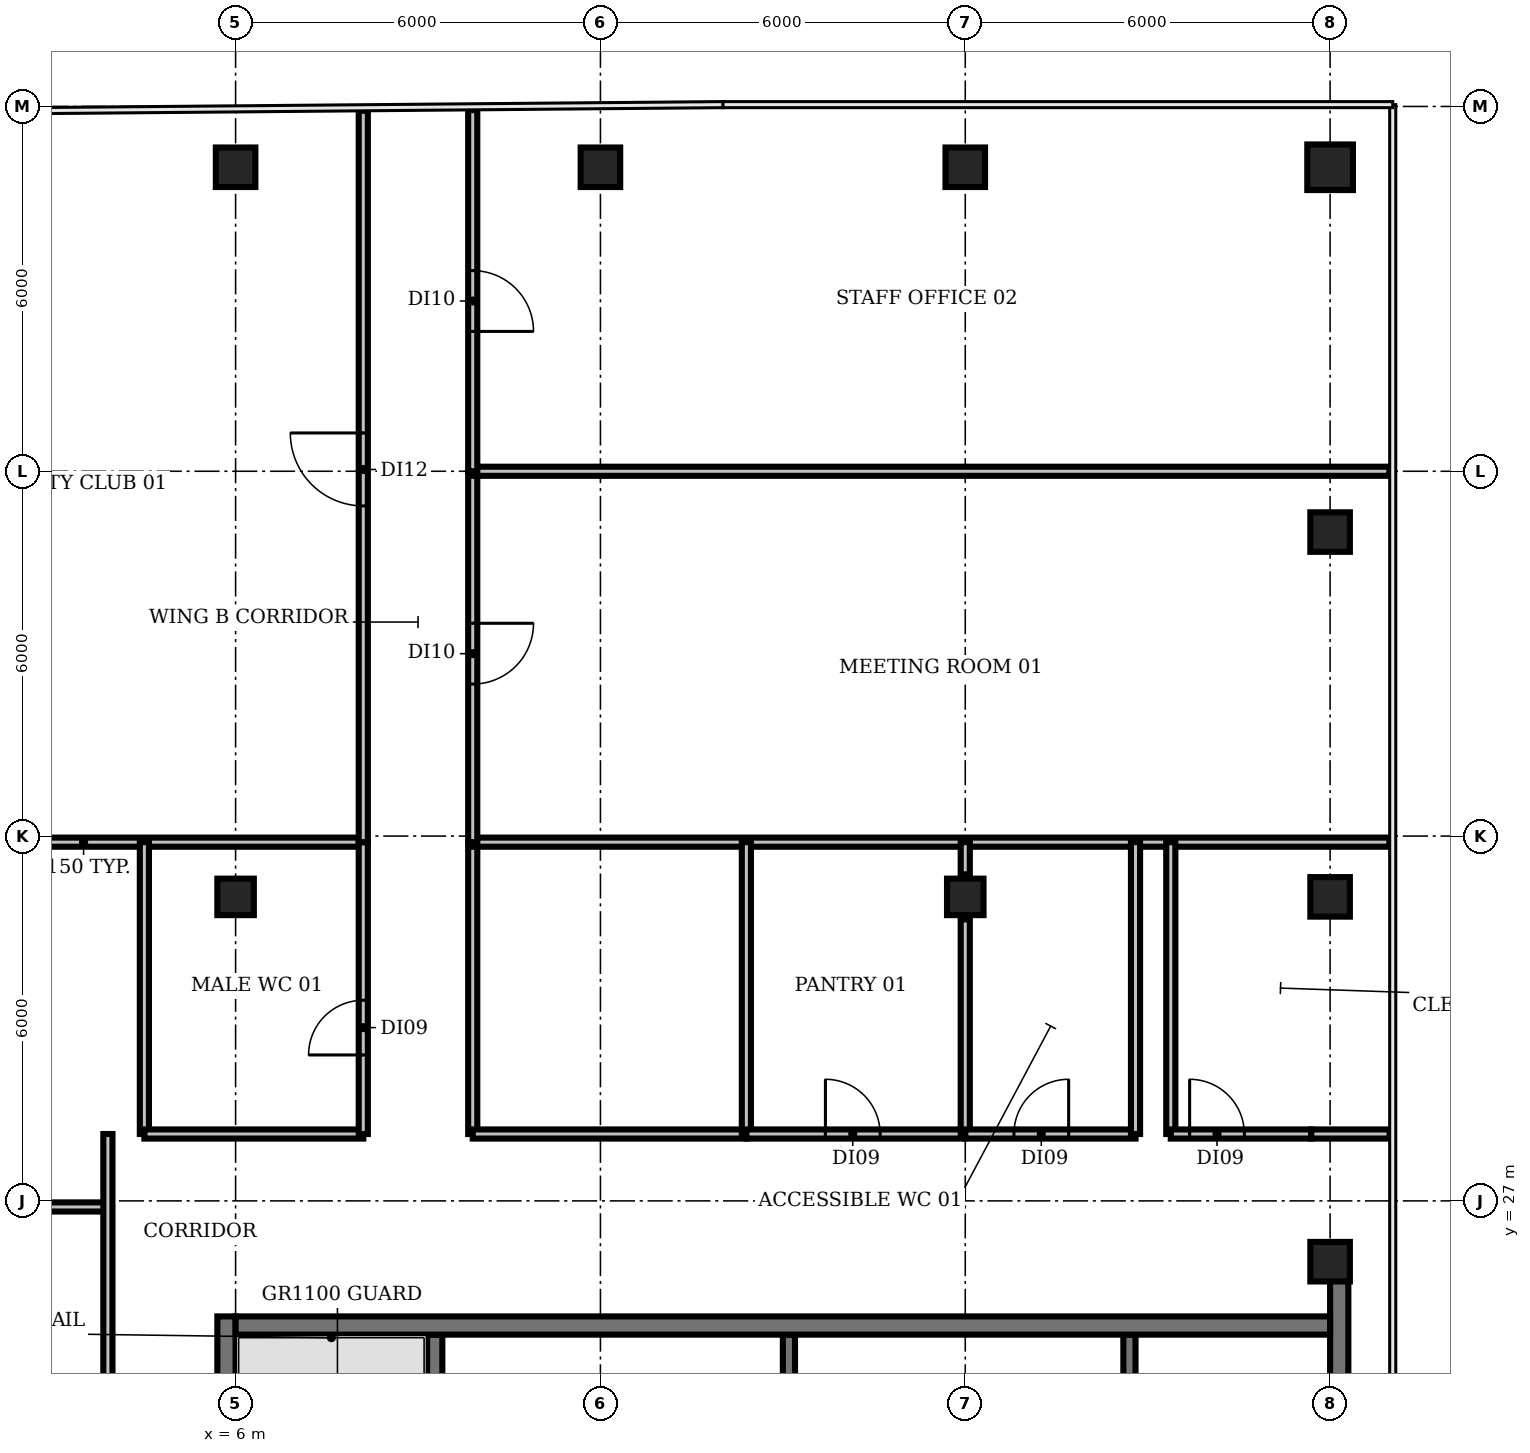
"""IFC4 building model, lengths in metres.
Left out: names, types, materials, properties, quantities, classifications, styles, units other than length and angle.
Written with IfcOpenShell. Run it as: python <this file> out.ifc"""

import sys

from ifc_helpers import new_model, si_unit, direction, frame, frame_2d, origin, origin_2d, place, context, subcontext, project, spatial, rectangle, circle, extrude, element, fill, save


model = new_model("IFC4")
c1 = context("Model", 3, precision=1e-05, world=origin(), true_north=direction((0.0, 1.0)))
c2 = subcontext(c1, "Body", "Model", "MODEL_VIEW")
j1 = project(units=[si_unit("LENGTHUNIT", "METRE"), si_unit("PLANEANGLEUNIT", "RADIAN")], contexts=[c1])
p1 = place(None, origin())
s1 = spatial("IfcSite", under=j1, at=p1, CompositionType="ELEMENT")
p2 = place(p1, origin())
s2 = spatial("IfcBuilding", under=s1, at=p2, CompositionType="ELEMENT")
p3 = place(p2, frame((0.0, 0.0, 331.4)))
s3 = spatial("IfcBuildingStorey", under=s2, at=p3, CompositionType="ELEMENT", Elevation=331.4)
p4 = place(p3, frame((6.0, 32.0, 0.0), z_axis=(0.0, 0.0, 1.0), x_axis=(1.0, 0.0, 0.0)))
e1 = element("IfcColumn", 1, at=p4, inside=s3, PredefinedType="COLUMN", context=c2, shape_type="SweptSolid", body=[
    extrude(rectangle(XDim=0.6, YDim=0.6, at=origin_2d()), origin(), (0.0, 0.0, 1.0), 3.9),
])
for number, where, z_axis, x_axis in (
    (2, (6.0, 44.0, 0.0), (0.0, 0.0, 1.0), (1.0, 0.0, 0.0)),
    (3, (12.0, 44.0, 0.0), (0.0, 0.0, 1.0), (1.0, 0.0, 0.0)),
):
    element("IfcColumn", number, at=place(p3, frame(where, z_axis=z_axis, x_axis=x_axis)), inside=s3, PredefinedType="COLUMN", context=c2, shape_type="SweptSolid", body=[
        extrude(rectangle(XDim=0.65, YDim=0.65, at=origin_2d()), origin(), (0.0, 0.0, 1.0), 3.9),
    ])
p5 = place(p3, frame((18.0, 32.0, 0.0), z_axis=(0.0, 0.0, 1.0), x_axis=(1.0, 0.0, 0.0)))
e4 = element("IfcColumn", 4, at=p5, inside=s3, PredefinedType="COLUMN", context=c2, shape_type="SweptSolid", body=[
    extrude(rectangle(XDim=0.6, YDim=0.6, at=origin_2d()), origin(), (0.0, 0.0, 1.0), 3.9),
])
for number, where, z_axis, x_axis in (
    (5, (18.0, 44.0, 0.0), (0.0, 0.0, 1.0), (1.0, 0.0, 0.0)),
    (6, (24.0, 26.0, 0.0), (0.0, 0.0, 1.0), (1.0, 0.0, 0.0)),
    (7, (24.0, 32.0, 0.0), (0.0, 0.0, 1.0), (1.0, 0.0, 0.0)),
    (8, (24.0, 38.0, 0.0), (0.0, 0.0, 1.0), (1.0, 0.0, 0.0)),
):
    element("IfcColumn", number, at=place(p3, frame(where, z_axis=z_axis, x_axis=x_axis)), inside=s3, PredefinedType="COLUMN", context=c2, shape_type="SweptSolid", body=[
        extrude(rectangle(XDim=0.65, YDim=0.65, at=origin_2d()), origin(), (0.0, 0.0, 1.0), 3.9),
    ])
p6 = place(p3, frame((24.0, 44.0, 0.0), z_axis=(0.0, 0.0, 1.0), x_axis=(1.0, 0.0, 0.0)))
e9 = element("IfcColumn", 9, at=p6, inside=s3, PredefinedType="COLUMN", context=c2, shape_type="SweptSolid", body=[
    extrude(circle(Radius=0.375, at=origin_2d()), origin(), (0.0, 0.0, 1.0), 3.9),
])
p7 = place(p3, frame((9.275, 18.375, 0.0), z_axis=(0.0, 0.0, 1.0), x_axis=(0.0, 1.0, 0.0)))
e10 = element("IfcWall", 10, at=p7, inside=s3, PredefinedType="SHEAR", context=c2, shape_type="SweptSolid", body=[
    extrude(rectangle(XDim=6.425, YDim=0.25, at=frame_2d((3.212, 0.0))), origin(), (0.0, 0.0, 1.0), 3.9),
])
for number, where, z_axis, x_axis in (
    (11, (15.1, 22.9, 0.0), (0.0, 0.0, 1.0), (0.0, 1.0, 0.0)),
    (12, (20.7, 22.9, 0.0), (0.0, 0.0, 1.0), (0.0, 1.0, 0.0)),
):
    element("IfcWall", number, at=place(p3, frame(where, z_axis=z_axis, x_axis=x_axis)), inside=s3, PredefinedType="SHEAR", context=c2, shape_type="SweptSolid", body=[
        extrude(rectangle(XDim=1.9, YDim=0.2, at=frame_2d((0.95, 0.0))), origin(), (0.0, 0.0, 1.0), 3.9),
    ])
p8 = place(p3, frame((5.85, 5.1, 0.0), z_axis=(0.0, 0.0, 1.0), x_axis=(0.0, 1.0, 0.0)))
e13 = element("IfcWall", 13, at=p8, inside=s3, PredefinedType="SHEAR", context=c2, shape_type="SweptSolid", body=[
    extrude(rectangle(XDim=20.0, YDim=0.3, at=frame_2d((10.0, 0.0))), origin(), (0.0, 0.0, 1.0), 3.9),
])
p9 = place(p8, frame((0.55, 0.0, 0.0)))
e14 = element("IfcOpeningElement", 14, at=p9, cuts=e13, PredefinedType="OPENING", context=c2, shape_type="SweptSolid", body=[
    extrude(rectangle(XDim=1.5, YDim=2.1, at=frame_2d((0.75, 1.05))), frame((0.0, 0.16, 0.0), z_axis=(0.0, -1.0, 0.0), x_axis=(1.0, 0.0, 0.0)), (0.0, 0.0, 1.0), 0.32),
])
p10 = place(p8, frame((7.0, 0.0, 0.0)))
e15 = element("IfcOpeningElement", 15, at=p10, cuts=e13, PredefinedType="OPENING", context=c2, shape_type="SweptSolid", body=[
    extrude(rectangle(XDim=1.2, YDim=2.1, at=frame_2d((0.6, 1.05))), frame((0.0, 0.16, 0.0), z_axis=(0.0, -1.0, 0.0), x_axis=(1.0, 0.0, 0.0)), (0.0, 0.0, 1.0), 0.32),
])
p11 = place(p8, frame((13.55, 0.0, 0.0)))
e16 = element("IfcOpeningElement", 16, at=p11, cuts=e13, PredefinedType="OPENING", context=c2, shape_type="SweptSolid", body=[
    extrude(rectangle(XDim=1.2, YDim=2.1, at=frame_2d((0.6, 1.05))), frame((0.0, 0.16, 0.0), z_axis=(0.0, -1.0, 0.0), x_axis=(1.0, 0.0, 0.0)), (0.0, 0.0, 1.0), 0.32),
])
p12 = place(p3, frame((24.15, 25.705, 0.0), z_axis=(0.0, 0.0, 1.0), x_axis=(0.0, -1.0, 0.0)))
e17 = element("IfcWall", 17, at=p12, inside=s3, PredefinedType="SHEAR", context=c2, shape_type="SweptSolid", body=[
    extrude(rectangle(XDim=20.605, YDim=0.3, at=frame_2d((10.302, 0.0))), origin(), (0.0, 0.0, 1.0), 3.9),
])
p13 = place(p12, frame((18.555, 0.0, 0.0)))
e18 = element("IfcOpeningElement", 18, at=p13, cuts=e17, PredefinedType="OPENING", context=c2, shape_type="SweptSolid", body=[
    extrude(rectangle(XDim=1.5, YDim=2.1, at=frame_2d((0.75, 1.05))), frame((0.0, 0.16, 0.0), z_axis=(0.0, -1.0, 0.0), x_axis=(1.0, 0.0, 0.0)), (0.0, 0.0, 1.0), 0.32),
])
p14 = place(p12, frame((12.455, 0.0, 0.0)))
e19 = element("IfcOpeningElement", 19, at=p14, cuts=e17, PredefinedType="OPENING", context=c2, shape_type="SweptSolid", body=[
    extrude(rectangle(XDim=0.9, YDim=2.1, at=frame_2d((0.45, 1.05))), frame((0.0, 0.16, 0.0), z_axis=(0.0, -1.0, 0.0), x_axis=(1.0, 0.0, 0.0)), (0.0, 0.0, 1.0), 0.32),
])
p15 = place(p12, frame((6.455, 0.0, 0.0)))
e20 = element("IfcOpeningElement", 20, at=p15, cuts=e17, PredefinedType="OPENING", context=c2, shape_type="SweptSolid", body=[
    extrude(rectangle(XDim=2.0, YDim=2.1, at=frame_2d((1.0, 1.05))), frame((0.0, 0.16, 0.0), z_axis=(0.0, -1.0, 0.0), x_axis=(1.0, 0.0, 0.0)), (0.0, 0.0, 1.0), 0.32),
])
p16 = place(p3, frame((6.0, 24.95, 0.0), z_axis=(0.0, 0.0, 1.0), x_axis=(1.0, 0.0, 0.0)))
e21 = element("IfcWall", 21, at=p16, inside=s3, PredefinedType="SHEAR", context=c2, shape_type="SweptSolid", body=[
    extrude(rectangle(XDim=18.0, YDim=0.3, at=frame_2d((9.0, 0.0))), origin(), (0.0, 0.0, 1.0), 3.9),
])
p17 = place(p3, frame((-1.1, 32.9, 0.0), z_axis=(0.0, 0.0, 1.0), x_axis=(1.0, 0.0, 0.0)))
e22 = element("IfcWall", 22, at=p17, inside=s3, PredefinedType="PARTITIONING", context=c2, shape_type="SweptSolid", body=[
    extrude(rectangle(XDim=9.2, YDim=0.15, at=frame_2d((4.6, 0.0))), origin(), (0.0, 0.0, 1.0), 2.48),
])
p18 = place(p3, frame((-1.04, 26.9, 0.0), z_axis=(0.0, 0.0, 1.0), x_axis=(1.0, 0.0, 0.0)))
e23 = element("IfcWall", 23, at=p18, inside=s3, PredefinedType="PARTITIONING", context=c2, shape_type="SweptSolid", body=[
    extrude(rectangle(XDim=4.94, YDim=0.15, at=frame_2d((2.47, 0.0))), origin(), (0.0, 0.0, 1.0), 2.48),
])
p19 = place(p3, frame((3.9, 22.5, 0.0), z_axis=(0.0, 0.0, 1.0), x_axis=(0.0, 1.0, 0.0)))
e24 = element("IfcWall", 24, at=p19, inside=s3, PredefinedType="PARTITIONING", context=c2, shape_type="SweptSolid", body=[
    extrude(rectangle(XDim=5.6, YDim=0.15, at=frame_2d((2.8, 0.0))), origin(), (0.0, 0.0, 1.0), 2.48),
])
p20 = place(p3, frame((4.5, 28.1, 0.0), z_axis=(0.0, 0.0, 1.0), x_axis=(0.0, 1.0, 0.0)))
e25 = element("IfcWall", 25, at=p20, inside=s3, PredefinedType="PARTITIONING", context=c2, shape_type="SweptSolid", body=[
    extrude(rectangle(XDim=4.8, YDim=0.15, at=frame_2d((2.4, 0.0))), origin(), (0.0, 0.0, 1.0), 2.48),
])
p21 = place(p3, frame((4.5, 28.1, 0.0), z_axis=(0.0, 0.0, 1.0), x_axis=(1.0, 0.0, 0.0)))
e26 = element("IfcWall", 26, at=p21, inside=s3, PredefinedType="PARTITIONING", context=c2, shape_type="SweptSolid", body=[
    extrude(rectangle(XDim=3.6, YDim=0.15, at=frame_2d((1.8, 0.0))), origin(), (0.0, 0.0, 1.0), 2.48),
])
p22 = place(p3, frame((8.1, 28.1, 0.0), z_axis=(0.0, 0.0, 1.0), x_axis=(0.0, 1.0, 0.0)))
e27 = element("IfcWall", 27, at=p22, inside=s3, PredefinedType="PARTITIONING", context=c2, shape_type="SweptSolid", body=[
    extrude(rectangle(XDim=4.8, YDim=0.15, at=frame_2d((2.4, 0.0))), origin(), (0.0, 0.0, 1.0), 2.48),
])
p23 = place(p22, frame((1.3, 0.0, 0.0)))
e28 = element("IfcOpeningElement", 28, at=p23, cuts=e27, PredefinedType="OPENING", context=c2, shape_type="SweptSolid", body=[
    extrude(rectangle(XDim=0.9, YDim=2.1, at=frame_2d((0.45, 1.05))), frame((0.0, 0.085, 0.0), z_axis=(0.0, -1.0, 0.0), x_axis=(1.0, 0.0, 0.0)), (0.0, 0.0, 1.0), 0.17),
])
p24 = place(p3, frame((8.1, 32.9, 0.0), z_axis=(0.0, 0.0, 1.0), x_axis=(0.0, 1.0, 0.0)))
e29 = element("IfcWall", 29, at=p24, inside=s3, PredefinedType="PARTITIONING", context=c2, shape_type="SweptSolid", body=[
    extrude(rectangle(XDim=12.03, YDim=0.15, at=frame_2d((6.015, 0.0))), origin(), (0.0, 0.0, 1.0), 2.48),
])
p25 = place(p24, frame((5.53, 0.0, 0.0)))
e30 = element("IfcOpeningElement", 30, at=p25, cuts=e29, PredefinedType="OPENING", context=c2, shape_type="SweptSolid", body=[
    extrude(rectangle(XDim=1.2, YDim=2.1, at=frame_2d((0.6, 1.05))), frame((0.0, 0.085, 0.0), z_axis=(0.0, -1.0, 0.0), x_axis=(1.0, 0.0, 0.0)), (0.0, 0.0, 1.0), 0.17),
])
p26 = place(p3, frame((9.9, 28.1, 0.0), z_axis=(0.0, 0.0, 1.0), x_axis=(0.0, 1.0, 0.0)))
e31 = element("IfcWall", 31, at=p26, inside=s3, PredefinedType="PARTITIONING", context=c2, shape_type="SweptSolid", body=[
    extrude(rectangle(XDim=4.8, YDim=0.15, at=frame_2d((2.4, 0.0))), origin(), (0.0, 0.0, 1.0), 2.48),
])
p27 = place(p3, frame((9.9, 28.1, 0.0), z_axis=(0.0, 0.0, 1.0), x_axis=(1.0, 0.0, 0.0)))
e32 = element("IfcWall", 32, at=p27, inside=s3, PredefinedType="PARTITIONING", context=c2, shape_type="SweptSolid", body=[
    extrude(rectangle(XDim=4.5, YDim=0.15, at=frame_2d((2.25, 0.0))), origin(), (0.0, 0.0, 1.0), 2.48),
])
p28 = place(p3, frame((9.9, 32.9, 0.0), z_axis=(0.0, 0.0, 1.0), x_axis=(1.0, 0.0, 0.0)))
e33 = element("IfcWall", 33, at=p28, inside=s3, PredefinedType="PARTITIONING", context=c2, shape_type="SweptSolid", body=[
    extrude(rectangle(XDim=15.075, YDim=0.15, at=frame_2d((7.538, 0.0))), origin(), (0.0, 0.0, 1.0), 2.48),
])
p29 = place(p3, frame((9.9, 39.0, 0.0), z_axis=(0.0, 0.0, 1.0), x_axis=(0.0, -1.0, 0.0)))
e34 = element("IfcWall", 34, at=p29, inside=s3, PredefinedType="PARTITIONING", context=c2, shape_type="SweptSolid", body=[
    extrude(rectangle(XDim=6.1, YDim=0.15, at=frame_2d((3.05, 0.0))), origin(), (0.0, 0.0, 1.0), 2.48),
])
p30 = place(p29, frame((2.5, 0.0, 0.0)))
e35 = element("IfcOpeningElement", 35, at=p30, cuts=e34, PredefinedType="OPENING", context=c2, shape_type="SweptSolid", body=[
    extrude(rectangle(XDim=1.0, YDim=2.1, at=frame_2d((0.5, 1.05))), frame((0.0, 0.085, 0.0), z_axis=(0.0, -1.0, 0.0), x_axis=(1.0, 0.0, 0.0)), (0.0, 0.0, 1.0), 0.17),
])
p31 = place(p3, frame((9.9, 39.0, 0.0), z_axis=(0.0, 0.0, 1.0), x_axis=(1.0, 0.0, 0.0)))
e36 = element("IfcWall", 36, at=p31, inside=s3, PredefinedType="PARTITIONING", context=c2, shape_type="SweptSolid", body=[
    extrude(rectangle(XDim=15.075, YDim=0.15, at=frame_2d((7.538, 0.0))), origin(), (0.0, 0.0, 1.0), 2.48),
])
p32 = place(p3, frame((9.9, 44.94, 0.0), z_axis=(0.0, 0.0, 1.0), x_axis=(0.0, -1.0, 0.0)))
e37 = element("IfcWall", 37, at=p32, inside=s3, PredefinedType="PARTITIONING", context=c2, shape_type="SweptSolid", body=[
    extrude(rectangle(XDim=5.94, YDim=0.15, at=frame_2d((2.97, 0.0))), origin(), (0.0, 0.0, 1.0), 2.48),
])
p33 = place(p32, frame((2.64, 0.0, 0.0)))
e38 = element("IfcOpeningElement", 38, at=p33, cuts=e37, PredefinedType="OPENING", context=c2, shape_type="SweptSolid", body=[
    extrude(rectangle(XDim=1.0, YDim=2.1, at=frame_2d((0.5, 1.05))), frame((0.0, 0.085, 0.0), z_axis=(0.0, -1.0, 0.0), x_axis=(1.0, 0.0, 0.0)), (0.0, 0.0, 1.0), 0.17),
])
p34 = place(p3, frame((14.4, 28.1, 0.0), z_axis=(0.0, 0.0, 1.0), x_axis=(0.0, 1.0, 0.0)))
e39 = element("IfcWall", 39, at=p34, inside=s3, PredefinedType="PARTITIONING", context=c2, shape_type="SweptSolid", body=[
    extrude(rectangle(XDim=4.8, YDim=0.15, at=frame_2d((2.4, 0.0))), origin(), (0.0, 0.0, 1.0), 2.48),
])
p35 = place(p3, frame((14.4, 28.1, 0.0), z_axis=(0.0, 0.0, 1.0), x_axis=(1.0, 0.0, 0.0)))
e40 = element("IfcWall", 40, at=p35, inside=s3, PredefinedType="PARTITIONING", context=c2, shape_type="SweptSolid", body=[
    extrude(rectangle(XDim=3.6, YDim=0.15, at=frame_2d((1.8, 0.0))), origin(), (0.0, 0.0, 1.0), 2.48),
])
p36 = place(p35, frame((1.3, 0.0, 0.0)))
e41 = element("IfcOpeningElement", 41, at=p36, cuts=e40, PredefinedType="OPENING", context=c2, shape_type="SweptSolid", body=[
    extrude(rectangle(XDim=0.9, YDim=2.1, at=frame_2d((0.45, 1.05))), frame((0.0, 0.085, 0.0), z_axis=(0.0, -1.0, 0.0), x_axis=(1.0, 0.0, 0.0)), (0.0, 0.0, 1.0), 0.17),
])
p37 = place(p3, frame((18.0, 28.1, 0.0), z_axis=(0.0, 0.0, 1.0), x_axis=(0.0, 1.0, 0.0)))
e42 = element("IfcWall", 42, at=p37, inside=s3, PredefinedType="PARTITIONING", context=c2, shape_type="SweptSolid", body=[
    extrude(rectangle(XDim=3.53, YDim=0.15, at=frame_2d((1.765, 0.0))), origin(), (0.0, 0.0, 1.0), 2.48),
])
p38 = place(p3, frame((18.0, 28.1, 0.0), z_axis=(0.0, 0.0, 1.0), x_axis=(1.0, 0.0, 0.0)))
e43 = element("IfcWall", 43, at=p38, inside=s3, PredefinedType="PARTITIONING", context=c2, shape_type="SweptSolid", body=[
    extrude(rectangle(XDim=2.8, YDim=0.15, at=frame_2d((1.4, 0.0))), origin(), (0.0, 0.0, 1.0), 2.48),
])
p39 = place(p38, frame((0.8, 0.0, 0.0)))
e44 = element("IfcOpeningElement", 44, at=p39, cuts=e43, PredefinedType="OPENING", context=c2, shape_type="SweptSolid", body=[
    extrude(rectangle(XDim=0.9, YDim=2.1, at=frame_2d((0.45, 1.05))), frame((0.0, 0.085, 0.0), z_axis=(0.0, -1.0, 0.0), x_axis=(1.0, 0.0, 0.0)), (0.0, 0.0, 1.0), 0.17),
])
p40 = place(p3, frame((18.0, 31.736, 0.0), z_axis=(0.0, 0.0, 1.0), x_axis=(0.0, 1.0, 0.0)))
e45 = element("IfcWall", 45, at=p40, inside=s3, PredefinedType="PARTITIONING", context=c2, shape_type="SweptSolid", body=[
    extrude(rectangle(XDim=0.529, YDim=0.15, at=frame_2d((0.264, 0.0))), origin(), (0.0, 0.0, 1.0), 2.48),
])
p41 = place(p3, frame((18.0, 32.37, 0.0), z_axis=(0.0, 0.0, 1.0), x_axis=(0.0, 1.0, 0.0)))
e46 = element("IfcWall", 46, at=p41, inside=s3, PredefinedType="PARTITIONING", context=c2, shape_type="SweptSolid", body=[
    extrude(rectangle(XDim=0.53, YDim=0.15, at=frame_2d((0.265, 0.0))), origin(), (0.0, 0.0, 1.0), 2.48),
])
for number, where, z_axis, x_axis in (
    (47, (20.8, 28.1, 0.0), (0.0, 0.0, 1.0), (0.0, 1.0, 0.0)),
    (48, (21.38, 28.1, 0.0), (0.0, 0.0, 1.0), (0.0, 1.0, 0.0)),
):
    element("IfcWall", number, at=place(p3, frame(where, z_axis=z_axis, x_axis=x_axis)), inside=s3, PredefinedType="PARTITIONING", context=c2, shape_type="SweptSolid", body=[
        extrude(rectangle(XDim=4.8, YDim=0.15, at=frame_2d((2.4, 0.0))), origin(), (0.0, 0.0, 1.0), 2.48),
    ])
p42 = place(p3, frame((21.38, 28.1, 0.0), z_axis=(0.0, 0.0, 1.0), x_axis=(1.0, 0.0, 0.0)))
e49 = element("IfcWall", 49, at=p42, inside=s3, PredefinedType="PARTITIONING", context=c2, shape_type="SweptSolid", body=[
    extrude(rectangle(XDim=2.31, YDim=0.15, at=frame_2d((1.155, 0.0))), origin(), (0.0, 0.0, 1.0), 2.48),
])
p43 = place(p42, frame((0.31, 0.0, 0.0)))
e50 = element("IfcOpeningElement", 50, at=p43, cuts=e49, PredefinedType="OPENING", context=c2, shape_type="SweptSolid", body=[
    extrude(rectangle(XDim=0.9, YDim=2.1, at=frame_2d((0.45, 1.05))), frame((0.0, 0.085, 0.0), z_axis=(0.0, -1.0, 0.0), x_axis=(1.0, 0.0, 0.0)), (0.0, 0.0, 1.0), 0.17),
])
p44 = place(p3, frame((23.69, 28.1, 0.0), z_axis=(0.0, 0.0, 1.0), x_axis=(1.0, 0.0, 0.0)))
e51 = element("IfcWall", 51, at=p44, inside=s3, PredefinedType="PARTITIONING", context=c2, shape_type="SweptSolid", body=[
    extrude(rectangle(XDim=1.29, YDim=0.15, at=frame_2d((0.645, 0.0))), origin(), (0.0, 0.0, 1.0), 2.48),
])
p45 = place(p23, origin())
e52 = element("IfcDoor", 52, at=p45, inside=s3, OperationType="SINGLE_SWING_LEFT", PredefinedType="DOOR", context=c2, shape_type="SweptSolid", body=[
    extrude(rectangle(XDim=0.9, YDim=2.1, at=frame_2d((0.45, 1.05))), frame((0.0, 0.025, 0.0), z_axis=(0.0, -1.0, 0.0), x_axis=(1.0, 0.0, 0.0)), (0.0, 0.0, 1.0), 0.05),
])
fill(e28, e52)
p46 = place(p25, origin())
e53 = element("IfcDoor", 53, at=p46, inside=s3, OperationType="SINGLE_SWING_RIGHT", PredefinedType="DOOR", context=c2, shape_type="SweptSolid", body=[
    extrude(rectangle(XDim=1.2, YDim=2.1, at=frame_2d((0.6, 1.05))), frame((0.0, 0.025, 0.0), z_axis=(0.0, -1.0, 0.0), x_axis=(1.0, 0.0, 0.0)), (0.0, 0.0, 1.0), 0.05),
])
fill(e30, e53)
p47 = place(p30, origin())
e54 = element("IfcDoor", 54, at=p47, inside=s3, OperationType="SINGLE_SWING_LEFT", PredefinedType="DOOR", context=c2, shape_type="SweptSolid", body=[
    extrude(rectangle(XDim=1.0, YDim=2.1, at=frame_2d((0.5, 1.05))), frame((0.0, 0.025, 0.0), z_axis=(0.0, -1.0, 0.0), x_axis=(1.0, 0.0, 0.0)), (0.0, 0.0, 1.0), 0.05),
])
fill(e35, e54)
p48 = place(p33, origin())
e55 = element("IfcDoor", 55, at=p48, inside=s3, OperationType="SINGLE_SWING_RIGHT", PredefinedType="DOOR", context=c2, shape_type="SweptSolid", body=[
    extrude(rectangle(XDim=1.0, YDim=2.1, at=frame_2d((0.5, 1.05))), frame((0.0, 0.025, 0.0), z_axis=(0.0, -1.0, 0.0), x_axis=(1.0, 0.0, 0.0)), (0.0, 0.0, 1.0), 0.05),
])
fill(e38, e55)
p49 = place(p36, origin())
e56 = element("IfcDoor", 56, at=p49, inside=s3, OperationType="SINGLE_SWING_LEFT", PredefinedType="DOOR", context=c2, shape_type="SweptSolid", body=[
    extrude(rectangle(XDim=0.9, YDim=2.1, at=frame_2d((0.45, 1.05))), frame((0.0, 0.025, 0.0), z_axis=(0.0, -1.0, 0.0), x_axis=(1.0, 0.0, 0.0)), (0.0, 0.0, 1.0), 0.05),
])
fill(e41, e56)
p50 = place(p39, origin())
e57 = element("IfcDoor", 57, at=p50, inside=s3, OperationType="SINGLE_SWING_RIGHT", PredefinedType="DOOR", context=c2, shape_type="SweptSolid", body=[
    extrude(rectangle(XDim=0.9, YDim=2.1, at=frame_2d((0.45, 1.05))), frame((0.0, 0.025, 0.0), z_axis=(0.0, -1.0, 0.0), x_axis=(1.0, 0.0, 0.0)), (0.0, 0.0, 1.0), 0.05),
])
fill(e44, e57)
p51 = place(p43, origin())
e58 = element("IfcDoor", 58, at=p51, inside=s3, OperationType="SINGLE_SWING_LEFT", PredefinedType="DOOR", context=c2, shape_type="SweptSolid", body=[
    extrude(rectangle(XDim=0.9, YDim=2.1, at=frame_2d((0.45, 1.05))), frame((0.0, 0.025, 0.0), z_axis=(0.0, -1.0, 0.0), x_axis=(1.0, 0.0, 0.0)), (0.0, 0.0, 1.0), 0.05),
])
fill(e50, e58)
save(model, sys.argv[1])
